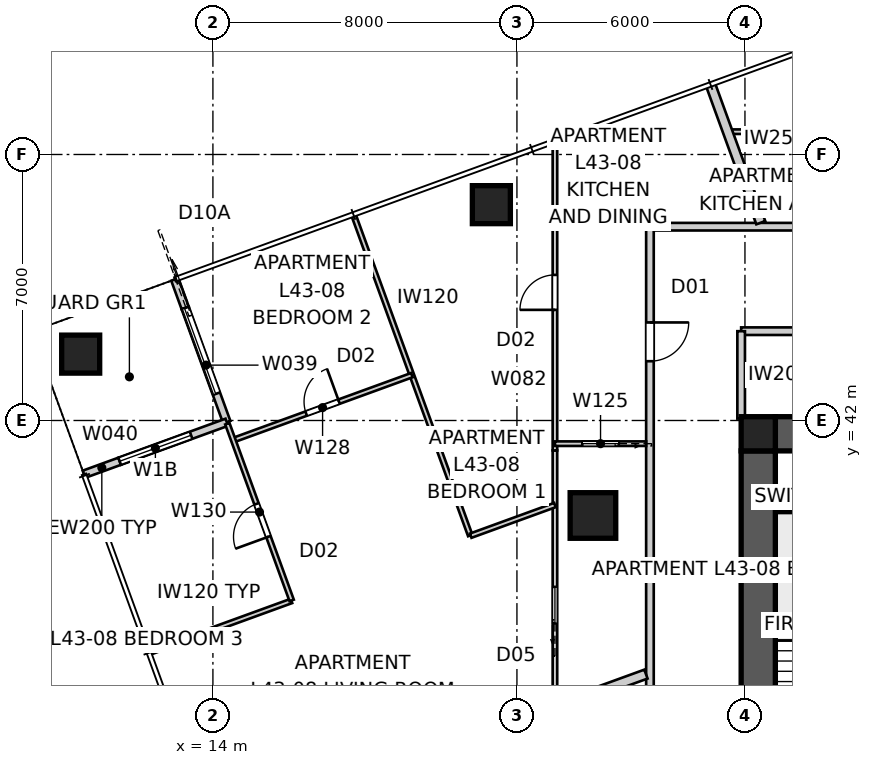
"""IFC4 building model, lengths in metres.
Left out: names, types, materials, properties, quantities, classifications, styles, units other than length and angle.
Written with IfcOpenShell. Run it as: python <this file> out.ifc"""

import sys

from ifc_helpers import new_model, si_unit, direction, frame, frame_2d, origin, origin_2d, place, context, subcontext, project, spatial, polyline, rectangle, outline, extrude, element, fill, save


model = new_model("IFC4")
c1 = context("Model", 3, precision=1e-05, world=origin(), true_north=direction((0.0, 1.0)))
c2 = subcontext(c1, "Body", "Model", "MODEL_VIEW")
j1 = project(units=[si_unit("LENGTHUNIT", "METRE"), si_unit("PLANEANGLEUNIT", "RADIAN")], contexts=[c1])
p1 = place(None, origin())
s1 = spatial("IfcSite", under=j1, at=p1, CompositionType="ELEMENT")
p2 = place(p1, origin())
s2 = spatial("IfcBuilding", under=s1, at=p2, CompositionType="ELEMENT")
p3 = place(p2, frame((0.0, 0.0, 157.4)))
s3 = spatial("IfcBuildingStorey", under=s2, at=p3, CompositionType="ELEMENT", Elevation=157.4)
p4 = place(p3, frame((28.8, 41.65, 0.0), z_axis=(0.0, 0.0, 1.0), x_axis=(1.0, 0.0, 0.0)))
e1 = element("IfcWall", 1, at=p4, inside=s3, PredefinedType="SHEAR", context=c2, shape_type="SweptSolid", body=[
    extrude(outline(polyline([(0.0, -0.45), (22.4, -0.45), (22.4, -0.025), (22.85, -0.025), (22.85, 0.025), (22.4, 0.025), (22.4, 0.45), (0.0, 0.45), (0.0, 0.025), (-0.45, 0.025), (-0.45, -0.025), (0.0, -0.025), (0.0, -0.45)])), origin(), (0.0, 0.0, 1.0), 3.4),
])
p5 = place(p3, frame((28.35, 41.2, 0.0), z_axis=(0.0, 0.0, 1.0), x_axis=(0.0, -1.0, 0.0)))
e2 = element("IfcWall", 2, at=p5, inside=s3, PredefinedType="SHEAR", context=c2, shape_type="SweptSolid", body=[
    extrude(outline(polyline([(0.0, -0.45), (22.4, -0.45), (22.4, -0.025), (22.85, -0.025), (22.85, 0.025), (22.4, 0.025), (22.4, 0.45), (0.0, 0.45), (0.0, 0.025), (-0.45, 0.025), (-0.45, -0.025), (0.0, -0.025), (0.0, -0.45)])), origin(), (0.0, 0.0, 1.0), 3.4),
])
p6 = place(p5, frame((11.14, 0.0, 0.0)))
e3 = element("IfcOpeningElement", 3, at=p6, cuts=e2, PredefinedType="OPENING", context=c2, shape_type="SweptSolid", body=[
    extrude(rectangle(XDim=1.02, YDim=2.4, at=frame_2d((0.51, 1.2))), frame((0.0, 0.46, 0.0), z_axis=(0.0, -1.0, 0.0), x_axis=(1.0, 0.0, 0.0)), (0.0, 0.0, 1.0), 0.92),
])
p7 = place(p3, frame((28.8, 39.75, 0.0), z_axis=(0.0, 0.0, 1.0), x_axis=(1.0, 0.0, 0.0)))
e4 = element("IfcWall", 4, at=p7, inside=s3, PredefinedType="SHEAR", context=c2, shape_type="SweptSolid", body=[
    extrude(rectangle(XDim=3.5, YDim=0.3, at=frame_2d((1.75, 0.0))), origin(), (0.0, 0.0, 1.0), 3.4),
])
p8 = place(p3, frame((28.35, 41.65, 0.0), z_axis=(0.0, 0.0, 1.0), x_axis=(1.0, 0.0, 0.0)))
e5 = element("IfcColumn", 5, at=p8, inside=s3, PredefinedType="COLUMN", context=c2, shape_type="SweptSolid", body=[
    extrude(rectangle(XDim=0.9, YDim=0.9, at=origin_2d()), origin(), (0.0, 0.0, 1.0), 3.4),
])
for number, where, z_axis, x_axis in (
    (6, (21.327, 47.68, 0.0), (0.0, 0.0, 1.0), (1.0, 0.0, 0.0)),
    (7, (10.521, 43.747, 0.0), (0.0, 0.0, 1.0), (1.0, 0.0, 0.0)),
):
    element("IfcColumn", number, at=place(p3, frame(where, z_axis=z_axis, x_axis=x_axis)), inside=s3, PredefinedType="COLUMN", context=c2, shape_type="SweptSolid", body=[
        extrude(rectangle(XDim=1.0, YDim=1.0, at=origin_2d()), origin(), (0.0, 0.0, 1.0), 3.4),
    ])
p9 = place(p3, frame((24.0, 39.5, 0.0), z_axis=(0.0, 0.0, 1.0), x_axis=(1.0, 0.0, 0.0)))
e8 = element("IfcColumn", 8, at=p9, inside=s3, PredefinedType="COLUMN", context=c2, shape_type="SweptSolid", body=[
    extrude(rectangle(XDim=1.2, YDim=1.2, at=origin_2d()), origin(), (0.0, 0.0, 1.0), 3.4),
])
p10 = place(p3, frame((12.998, 45.712, 0.0), z_axis=(0.0, 0.0, 1.0), x_axis=(0.342110593602, -0.939659694648, 0.0)))
e9 = element("IfcWall", 9, at=p10, inside=s3, PredefinedType="SOLIDWALL", context=c2, shape_type="SweptSolid", body=[
    extrude(rectangle(XDim=0.8, YDim=0.2, at=frame_2d((0.4, 0.0))), origin(), (0.0, 0.0, 1.0), 3.25),
])
p11 = place(p3, frame((13.271, 44.96, 0.0), z_axis=(0.0, 0.0, 1.0), x_axis=(0.342018703306, -0.939693144909, 0.0)))
e10 = element("IfcWall", 10, at=p11, inside=s3, PredefinedType="SOLIDWALL", context=c2, shape_type="SweptSolid", body=[
    extrude(rectangle(XDim=3.2, YDim=0.2, at=frame_2d((1.6, 0.0))), origin(), (0.0, 0.0, 1.0), 2.722),
])
p12 = place(p11, origin())
e11 = element("IfcOpeningElement", 11, at=p12, cuts=e10, PredefinedType="OPENING", context=c2, shape_type="SweptSolid", body=[
    extrude(rectangle(XDim=2.4, YDim=2.1, at=frame_2d((1.2, 1.05))), frame((0.0, 0.11, 0.0), z_axis=(0.0, -1.0, 0.0), x_axis=(1.0, 0.0, 0.0)), (0.0, 0.0, 1.0), 0.22),
])
p13 = place(p3, frame((14.366, 41.953, 0.0), z_axis=(0.0, 0.0, 1.0), x_axis=(-0.939712609717, -0.341965219194, 0.0)))
e12 = element("IfcWall", 12, at=p13, inside=s3, PredefinedType="SOLIDWALL", context=c2, shape_type="SweptSolid", body=[
    extrude(rectangle(XDim=3.0, YDim=0.2, at=frame_2d((1.5, 0.0))), origin(), (0.0, 0.0, 1.0), 2.722),
])
p14 = place(p13, frame((1.0, 0.0, 0.45)))
e13 = element("IfcOpeningElement", 13, at=p14, cuts=e12, PredefinedType="OPENING", context=c2, shape_type="SweptSolid", body=[
    extrude(rectangle(XDim=2.0, YDim=1.8, at=frame_2d((1.0, 0.9))), frame((0.0, 0.11, 0.0), z_axis=(0.0, -1.0, 0.0), x_axis=(1.0, 0.0, 0.0)), (0.0, 0.0, 1.0), 0.22),
])
p15 = place(p3, frame((11.547, 40.927, 0.0), z_axis=(0.0, 0.0, 1.0), x_axis=(-0.939686455819, -0.342037080957, 0.0)))
e14 = element("IfcWall", 14, at=p15, inside=s3, PredefinedType="SOLIDWALL", context=c2, shape_type="SweptSolid", body=[
    extrude(rectangle(XDim=1.0, YDim=0.2, at=frame_2d((0.5, 0.0))), origin(), (0.0, 0.0, 1.0), 3.25),
])
p16 = place(p3, frame((33.098, 47.1, 0.0), z_axis=(0.0, 0.0, 1.0), x_axis=(-1.0, 0.0, 0.0)))
e15 = element("IfcWall", 15, at=p16, inside=s3, PredefinedType="PARTITIONING", context=c2, shape_type="SweptSolid", body=[
    extrude(rectangle(XDim=7.598, YDim=0.2, at=frame_2d((3.799, 0.0))), origin(), (0.0, 0.0, 1.0), 3.25),
])
p17 = place(p3, frame((25.5, 47.1, 0.0), z_axis=(0.0, 0.0, 1.0), x_axis=(0.0, -1.0, 0.0)))
e16 = element("IfcWall", 16, at=p17, inside=s3, PredefinedType="PARTITIONING", context=c2, shape_type="SweptSolid", body=[
    extrude(rectangle(XDim=33.4, YDim=0.2, at=frame_2d((16.7, 0.0))), origin(), (0.0, 0.0, 1.0), 3.25),
])
p18 = place(p17, frame((2.52, 0.0, 0.0)))
e17 = element("IfcOpeningElement", 17, at=p18, cuts=e16, PredefinedType="OPENING", context=c2, shape_type="SweptSolid", body=[
    extrude(rectangle(XDim=1.02, YDim=2.34, at=frame_2d((0.51, 1.17))), frame((0.0, 0.11, 0.0), z_axis=(0.0, -1.0, 0.0), x_axis=(1.0, 0.0, 0.0)), (0.0, 0.0, 1.0), 0.22),
])
p19 = place(p17, frame((27.383, 0.0, 0.0)))
e18 = element("IfcOpeningElement", 18, at=p19, cuts=e16, PredefinedType="OPENING", context=c2, shape_type="SweptSolid", body=[
    extrude(rectangle(XDim=1.02, YDim=2.1, at=frame_2d((0.51, 1.05))), frame((0.0, 0.11, 0.0), z_axis=(0.0, -1.0, 0.0), x_axis=(1.0, 0.0, 0.0)), (0.0, 0.0, 1.0), 0.22),
])
p20 = place(p3, frame((27.093, 50.843, 0.0), z_axis=(0.0, 0.0, 1.0), x_axis=(0.342031698406, -0.939688415, 0.0)))
e19 = element("IfcWall", 19, at=p20, inside=s3, PredefinedType="PARTITIONING", context=c2, shape_type="SweptSolid", body=[
    extrude(rectangle(XDim=3.871, YDim=0.25, at=frame_2d((1.936, 0.0))), origin(), (0.0, 0.0, 1.0), 3.25),
])
p21 = place(p3, frame((14.027, 31.188, 0.0), z_axis=(0.0, 0.0, 1.0), x_axis=(0.939693801585, 0.342016899091, 0.0)))
e20 = element("IfcWall", 20, at=p21, inside=s3, PredefinedType="PARTITIONING", context=c2, shape_type="SweptSolid", body=[
    extrude(rectangle(XDim=12.097, YDim=0.25, at=frame_2d((6.049, 0.0))), origin(), (0.0, 0.0, 1.0), 3.25),
])
p22 = place(p3, frame((52.1, 44.35, 0.0), z_axis=(0.0, 0.0, 1.0), x_axis=(-1.0, 0.0, 0.0)))
e21 = element("IfcWall", 21, at=p22, inside=s3, PredefinedType="PARTITIONING", context=c2, shape_type="SweptSolid", body=[
    extrude(rectangle(XDim=24.2, YDim=0.2, at=frame_2d((12.1, 0.0))), origin(), (0.0, 0.0, 1.0), 3.25),
])
p23 = place(p22, frame((18.789, 0.0, 0.0)))
e22 = element("IfcOpeningElement", 22, at=p23, cuts=e21, PredefinedType="OPENING", context=c2, shape_type="SweptSolid", body=[
    extrude(rectangle(XDim=1.02, YDim=2.1, at=frame_2d((0.51, 1.05))), frame((0.0, 0.11, 0.0), z_axis=(0.0, -1.0, 0.0), x_axis=(1.0, 0.0, 0.0)), (0.0, 0.0, 1.0), 0.22),
])
p24 = place(p22, frame((4.391, 0.0, 0.0)))
e23 = element("IfcOpeningElement", 23, at=p24, cuts=e21, PredefinedType="OPENING", context=c2, shape_type="SweptSolid", body=[
    extrude(rectangle(XDim=1.02, YDim=2.1, at=frame_2d((0.51, 1.05))), frame((0.0, 0.11, 0.0), z_axis=(0.0, -1.0, 0.0), x_axis=(1.0, 0.0, 0.0)), (0.0, 0.0, 1.0), 0.22),
])
p25 = place(p22, frame((11.59, 0.0, 0.0)))
e24 = element("IfcOpeningElement", 24, at=p25, cuts=e21, PredefinedType="OPENING", context=c2, shape_type="SweptSolid", body=[
    extrude(rectangle(XDim=1.02, YDim=2.1, at=frame_2d((0.51, 1.05))), frame((0.0, 0.11, 0.0), z_axis=(0.0, -1.0, 0.0), x_axis=(1.0, 0.0, 0.0)), (0.0, 0.0, 1.0), 0.22),
])
p26 = place(p3, frame((27.9, 44.35, 0.0), z_axis=(0.0, 0.0, 1.0), x_axis=(0.0, -1.0, 0.0)))
e25 = element("IfcWall", 25, at=p26, inside=s3, PredefinedType="PARTITIONING", context=c2, shape_type="SweptSolid", body=[
    extrude(rectangle(XDim=2.3, YDim=0.2, at=frame_2d((1.15, 0.0))), origin(), (0.0, 0.0, 1.0), 3.25),
])
p27 = place(p3, frame((23.0, 21.7, 0.0), z_axis=(0.0, 0.0, 1.0), x_axis=(0.0, 1.0, 0.0)))
e26 = element("IfcWall", 26, at=p27, inside=s3, PredefinedType="PARTITIONING", context=c2, shape_type="SweptSolid", body=[
    extrude(rectangle(XDim=19.512, YDim=0.12, at=frame_2d((9.756, 0.0))), origin(), (0.0, 0.0, 1.0), 2.55),
])
p28 = place(p27, frame((14.961, 0.0, 0.0)))
e27 = element("IfcOpeningElement", 27, at=p28, cuts=e26, PredefinedType="OPENING", context=c2, shape_type="SweptSolid", body=[
    extrude(rectangle(XDim=0.96, YDim=2.1, at=frame_2d((0.48, 1.05))), frame((0.0, 0.07, 0.0), z_axis=(0.0, -1.0, 0.0), x_axis=(1.0, 0.0, 0.0)), (0.0, 0.0, 1.0), 0.14),
])
p29 = place(p27, frame((0.641, 0.0, 0.0)))
e28 = element("IfcOpeningElement", 28, at=p29, cuts=e26, PredefinedType="OPENING", context=c2, shape_type="SweptSolid", body=[
    extrude(rectangle(XDim=0.96, YDim=2.1, at=frame_2d((0.48, 1.05))), frame((0.0, 0.07, 0.0), z_axis=(0.0, -1.0, 0.0), x_axis=(1.0, 0.0, 0.0)), (0.0, 0.0, 1.0), 0.14),
])
p30 = place(p27, frame((9.587, 0.0, 0.0)))
e29 = element("IfcOpeningElement", 29, at=p30, cuts=e26, PredefinedType="OPENING", context=c2, shape_type="SweptSolid", body=[
    extrude(rectangle(XDim=0.96, YDim=2.1, at=frame_2d((0.48, 1.05))), frame((0.0, 0.07, 0.0), z_axis=(0.0, -1.0, 0.0), x_axis=(1.0, 0.0, 0.0)), (0.0, 0.0, 1.0), 0.14),
])
p31 = place(p3, frame((27.545, 49.6, 0.0), z_axis=(0.0, 0.0, 1.0), x_axis=(1.0, 0.0, 0.0)))
e30 = element("IfcWall", 30, at=p31, inside=s3, PredefinedType="PARTITIONING", context=c2, shape_type="SweptSolid", body=[
    extrude(rectangle(XDim=29.455, YDim=0.12, at=frame_2d((14.727, 0.0))), origin(), (0.0, 0.0, 1.0), 3.25),
])
p32 = place(p31, frame((4.887, 0.0, 0.0)))
e31 = element("IfcOpeningElement", 31, at=p32, cuts=e30, PredefinedType="OPENING", context=c2, shape_type="SweptSolid", body=[
    extrude(rectangle(XDim=0.92, YDim=2.34, at=frame_2d((0.46, 1.17))), frame((0.0, 0.07, 0.0), z_axis=(0.0, -1.0, 0.0), x_axis=(1.0, 0.0, 0.0)), (0.0, 0.0, 1.0), 0.14),
])
p33 = place(p31, frame((25.418, 0.0, 0.0)))
e32 = element("IfcOpeningElement", 32, at=p33, cuts=e30, PredefinedType="OPENING", context=c2, shape_type="SweptSolid", body=[
    extrude(rectangle(XDim=0.92, YDim=2.34, at=frame_2d((0.46, 1.17))), frame((0.0, 0.07, 0.0), z_axis=(0.0, -1.0, 0.0), x_axis=(1.0, 0.0, 0.0)), (0.0, 0.0, 1.0), 0.14),
])
p34 = place(p31, frame((19.616, 0.0, 0.0)))
e33 = element("IfcOpeningElement", 33, at=p34, cuts=e30, PredefinedType="OPENING", context=c2, shape_type="SweptSolid", body=[
    extrude(rectangle(XDim=0.92, YDim=2.34, at=frame_2d((0.46, 1.17))), frame((0.0, 0.07, 0.0), z_axis=(0.0, -1.0, 0.0), x_axis=(1.0, 0.0, 0.0)), (0.0, 0.0, 1.0), 0.14),
])
p35 = place(p31, frame((21.452, 0.0, 0.0)))
e34 = element("IfcOpeningElement", 34, at=p35, cuts=e30, PredefinedType="OPENING", context=c2, shape_type="SweptSolid", body=[
    extrude(rectangle(XDim=0.92, YDim=2.34, at=frame_2d((0.46, 1.17))), frame((0.0, 0.07, 0.0), z_axis=(0.0, -1.0, 0.0), x_axis=(1.0, 0.0, 0.0)), (0.0, 0.0, 1.0), 0.14),
])
p36 = place(p3, frame((25.4, 41.39, 0.0), z_axis=(0.0, 0.0, 1.0), x_axis=(-1.0, 0.0, 0.0)))
e35 = element("IfcWall", 35, at=p36, inside=s3, PredefinedType="PARTITIONING", context=c2, shape_type="SweptSolid", body=[
    extrude(rectangle(XDim=2.4, YDim=0.12, at=frame_2d((1.2, 0.0))), origin(), (0.0, 0.0, 1.0), 3.25),
])
p37 = place(p36, frame((0.72, 0.0, 0.0)))
e36 = element("IfcOpeningElement", 36, at=p37, cuts=e35, PredefinedType="OPENING", context=c2, shape_type="SweptSolid", body=[
    extrude(rectangle(XDim=0.96, YDim=2.1, at=frame_2d((0.48, 1.05))), frame((0.0, 0.07, 0.0), z_axis=(0.0, -1.0, 0.0), x_axis=(1.0, 0.0, 0.0)), (0.0, 0.0, 1.0), 0.14),
])
p38 = place(p3, frame((17.71, 47.385, 0.0), z_axis=(0.0, 0.0, 1.0), x_axis=(0.342034340019, -0.939687453491, 0.0)))
e37 = element("IfcWall", 37, at=p38, inside=s3, PredefinedType="PARTITIONING", context=c2, shape_type="SweptSolid", body=[
    extrude(rectangle(XDim=8.95, YDim=0.12, at=frame_2d((4.475, 0.0))), origin(), (0.0, 0.0, 1.0), 3.25),
])
p39 = place(p3, frame((20.784, 38.969, 0.0), z_axis=(0.0, 0.0, 1.0), x_axis=(0.939696672396, 0.342009011412, 0.0)))
e38 = element("IfcWall", 38, at=p39, inside=s3, PredefinedType="PARTITIONING", context=c2, shape_type="SweptSolid", body=[
    extrude(rectangle(XDim=2.359, YDim=0.12, at=frame_2d((1.179, 0.0))), origin(), (0.0, 0.0, 1.0), 3.25),
])
p40 = place(p3, frame((14.537, 41.484, 0.0), z_axis=(0.0, 0.0, 1.0), x_axis=(0.939696437289, 0.342009657388, 0.0)))
e39 = element("IfcWall", 39, at=p40, inside=s3, PredefinedType="PARTITIONING", context=c2, shape_type="SweptSolid", body=[
    extrude(rectangle(XDim=5.0, YDim=0.12, at=frame_2d((2.5, 0.0))), origin(), (0.0, 0.0, 1.0), 3.25),
])
p41 = place(p40, frame((2.04, 0.0, 0.0)))
e40 = element("IfcOpeningElement", 40, at=p41, cuts=e39, PredefinedType="OPENING", context=c2, shape_type="SweptSolid", body=[
    extrude(rectangle(XDim=0.92, YDim=2.34, at=frame_2d((0.46, 1.17))), frame((0.0, 0.07, 0.0), z_axis=(0.0, -1.0, 0.0), x_axis=(1.0, 0.0, 0.0)), (0.0, 0.0, 1.0), 0.14),
])
p42 = place(p3, frame((12.355, 35.901, 0.0), z_axis=(0.0, 0.0, 1.0), x_axis=(0.939701350773, 0.341996156931, 0.0)))
e41 = element("IfcWall", 41, at=p42, inside=s3, PredefinedType="PARTITIONING", context=c2, shape_type="SweptSolid", body=[
    extrude(rectangle(XDim=3.95, YDim=0.12, at=frame_2d((1.975, 0.0))), origin(), (0.0, 0.0, 1.0), 3.25),
])
p43 = place(p3, frame((16.073, 37.264, 0.0), z_axis=(0.0, 0.0, 1.0), x_axis=(-0.34204797738, 0.939682489552, 0.0)))
e42 = element("IfcWall", 42, at=p43, inside=s3, PredefinedType="PARTITIONING", context=c2, shape_type="SweptSolid", body=[
    extrude(rectangle(XDim=4.95, YDim=0.12, at=frame_2d((2.475, 0.0))), origin(), (0.0, 0.0, 1.0), 3.25),
])
p44 = place(p43, frame((1.785, 0.0, 0.0)))
e43 = element("IfcOpeningElement", 43, at=p44, cuts=e42, PredefinedType="OPENING", context=c2, shape_type="SweptSolid", body=[
    extrude(rectangle(XDim=0.92, YDim=2.34, at=frame_2d((0.46, 1.17))), frame((0.0, 0.07, 0.0), z_axis=(0.0, -1.0, 0.0), x_axis=(1.0, 0.0, 0.0)), (0.0, 0.0, 1.0), 0.14),
])
p45 = place(p3, frame((23.0, 41.212, 0.0), z_axis=(0.0, 0.0, 1.0), x_axis=(0.0, 1.0, 0.0)))
e44 = element("IfcWall", 44, at=p45, inside=s3, PredefinedType="PARTITIONING", context=c2, shape_type="SweptSolid", body=[
    extrude(rectangle(XDim=8.098, YDim=0.12, at=frame_2d((4.049, 0.0))), origin(), (0.0, 0.0, 1.0), 3.25),
])
p46 = place(p45, frame((3.699, 0.0, 0.0)))
e45 = element("IfcOpeningElement", 45, at=p46, cuts=e44, PredefinedType="OPENING", context=c2, shape_type="SweptSolid", body=[
    extrude(rectangle(XDim=0.92, YDim=2.34, at=frame_2d((0.46, 1.17))), frame((0.0, 0.07, 0.0), z_axis=(0.0, -1.0, 0.0), x_axis=(1.0, 0.0, 0.0)), (0.0, 0.0, 1.0), 0.14),
])
p47 = place(p12, origin())
e46 = element("IfcDoor", 46, at=p47, inside=s3, OperationType="SLIDING_TO_LEFT", PredefinedType="DOOR", context=c2, shape_type="SweptSolid", body=[
    extrude(rectangle(XDim=2.4, YDim=2.1, at=frame_2d((1.2, 1.05))), frame((0.0, 0.025, 0.0), z_axis=(0.0, -1.0, 0.0), x_axis=(1.0, 0.0, 0.0)), (0.0, 0.0, 1.0), 0.05),
])
fill(e11, e46)
p48 = place(p14, origin())
e47 = element("IfcWindow", 47, at=p48, inside=s3, PartitioningType="SINGLE_PANEL", PredefinedType="WINDOW", context=c2, shape_type="SweptSolid", body=[
    extrude(rectangle(XDim=2.0, YDim=1.8, at=frame_2d((1.0, 0.9))), frame((0.0, 0.03, 0.0), z_axis=(0.0, -1.0, 0.0), x_axis=(1.0, 0.0, 0.0)), (0.0, 0.0, 1.0), 0.06),
])
fill(e13, e47)
p49 = place(p18, origin())
e48 = element("IfcDoor", 48, at=p49, inside=s3, OperationType="SINGLE_SWING_LEFT", PredefinedType="DOOR", context=c2, shape_type="SweptSolid", body=[
    extrude(rectangle(XDim=1.02, YDim=2.34, at=frame_2d((0.51, 1.17))), frame((0.0, 0.025, 0.0), z_axis=(0.0, -1.0, 0.0), x_axis=(1.0, 0.0, 0.0)), (0.0, 0.0, 1.0), 0.05),
])
fill(e17, e48)
p50 = place(p46, origin())
e49 = element("IfcDoor", 49, at=p50, inside=s3, OperationType="SINGLE_SWING_LEFT", PredefinedType="DOOR", context=c2, shape_type="SweptSolid", body=[
    extrude(rectangle(XDim=0.92, YDim=2.34, at=frame_2d((0.46, 1.17))), frame((0.0, 0.025, 0.0), z_axis=(0.0, -1.0, 0.0), x_axis=(1.0, 0.0, 0.0)), (0.0, 0.0, 1.0), 0.05),
])
fill(e45, e49)
p51 = place(p37, origin())
e50 = element("IfcDoor", 50, at=p51, inside=s3, OperationType="SLIDING_TO_LEFT", PredefinedType="DOOR", context=c2, shape_type="SweptSolid", body=[
    extrude(rectangle(XDim=0.96, YDim=2.1, at=frame_2d((0.48, 1.05))), frame((0.0, 0.025, 0.0), z_axis=(0.0, -1.0, 0.0), x_axis=(1.0, 0.0, 0.0)), (0.0, 0.0, 1.0), 0.05),
])
fill(e36, e50)
p52 = place(p28, origin())
e51 = element("IfcDoor", 51, at=p52, inside=s3, OperationType="SLIDING_TO_LEFT", PredefinedType="DOOR", context=c2, shape_type="SweptSolid", body=[
    extrude(rectangle(XDim=0.96, YDim=2.1, at=frame_2d((0.48, 1.05))), frame((0.0, 0.025, 0.0), z_axis=(0.0, -1.0, 0.0), x_axis=(1.0, 0.0, 0.0)), (0.0, 0.0, 1.0), 0.05),
])
fill(e27, e51)
p53 = place(p41, origin())
e52 = element("IfcDoor", 52, at=p53, inside=s3, OperationType="SINGLE_SWING_RIGHT", PredefinedType="DOOR", context=c2, shape_type="SweptSolid", body=[
    extrude(rectangle(XDim=0.92, YDim=2.34, at=frame_2d((0.46, 1.17))), frame((0.0, 0.025, 0.0), z_axis=(0.0, -1.0, 0.0), x_axis=(1.0, 0.0, 0.0)), (0.0, 0.0, 1.0), 0.05),
])
fill(e40, e52)
p54 = place(p44, origin())
e53 = element("IfcDoor", 53, at=p54, inside=s3, OperationType="SINGLE_SWING_LEFT", PredefinedType="DOOR", context=c2, shape_type="SweptSolid", body=[
    extrude(rectangle(XDim=0.92, YDim=2.34, at=frame_2d((0.46, 1.17))), frame((0.0, 0.025, 0.0), z_axis=(0.0, -1.0, 0.0), x_axis=(1.0, 0.0, 0.0)), (0.0, 0.0, 1.0), 0.05),
])
fill(e43, e53)
save(model, sys.argv[1])
